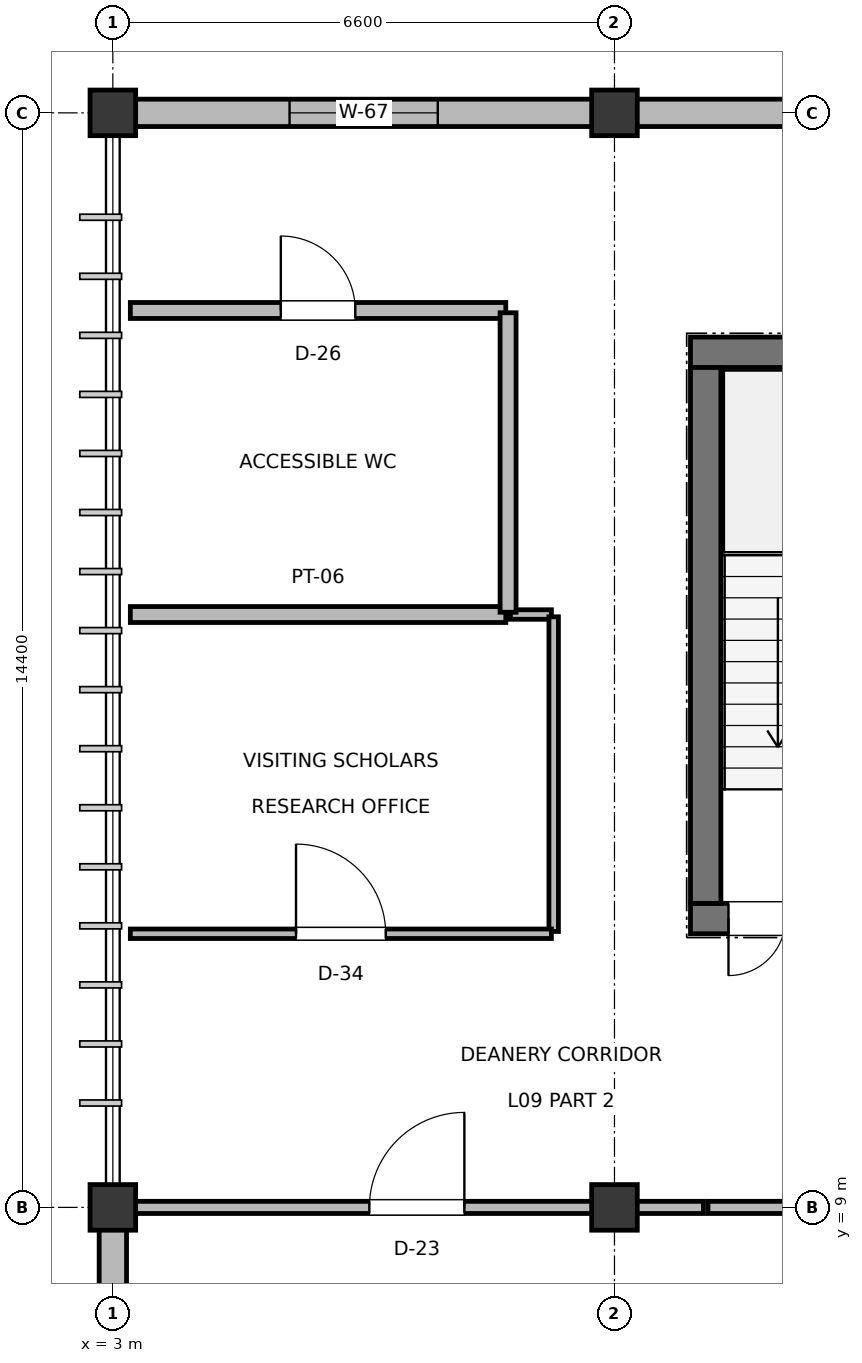
"""IFC4 building model, lengths in metres.
Left out: names, types, materials, properties, quantities, classifications, styles, units other than length and angle.
Written with IfcOpenShell. Run it as: python <this file> out.ifc"""

import sys

from ifc_helpers import new_model, si_unit, direction, frame, frame_2d, origin, origin_2d, place, context, subcontext, project, spatial, rectangle, extrude, element, fill, save


model = new_model("IFC4")
c1 = context("Model", 3, precision=1e-05, world=origin(), true_north=direction((0.0, 1.0)))
c2 = subcontext(c1, "Body", "Model", "MODEL_VIEW")
j1 = project(units=[si_unit("LENGTHUNIT", "METRE"), si_unit("PLANEANGLEUNIT", "RADIAN")], contexts=[c1])
p1 = place(None, origin())
s1 = spatial("IfcSite", under=j1, at=p1, CompositionType="ELEMENT")
p2 = place(p1, origin())
s2 = spatial("IfcBuilding", under=s1, at=p2, CompositionType="ELEMENT")
p3 = place(p2, frame((0.0, 0.0, 40.6)))
s3 = spatial("IfcBuildingStorey", under=s2, at=p3, CompositionType="ELEMENT", Elevation=40.6)
for number, where, z_axis, x_axis in (
    (1, (3.0, 9.0, 0.0), (0.0, 0.0, 1.0), (1.0, 0.0, 0.0)),
    (2, (3.0, 23.4, 0.0), (0.0, 0.0, 1.0), (1.0, 0.0, 0.0)),
    (3, (9.6, 9.0, 0.0), (0.0, 0.0, 1.0), (1.0, 0.0, 0.0)),
    (4, (9.6, 23.4, 0.0), (0.0, 0.0, 1.0), (1.0, 0.0, 0.0)),
):
    element("IfcColumn", number, at=place(p3, frame(where, z_axis=z_axis, x_axis=x_axis)), inside=s3, PredefinedType="COLUMN", context=c2, shape_type="SweptSolid", body=[
        extrude(rectangle(XDim=0.6, YDim=0.6, at=origin_2d()), origin(), (0.0, 0.0, 1.0), 4.0),
    ])
p4 = place(p3, frame((3.0, 3.285, 0.0), z_axis=(0.0, 0.0, 1.0), x_axis=(0.0, 1.0, 0.0)))
e5 = element("IfcWall", 5, at=p4, inside=s3, PredefinedType="SOLIDWALL", context=c2, shape_type="SweptSolid", body=[
    extrude(rectangle(XDim=5.43, YDim=0.36, at=frame_2d((2.715, 0.0))), origin(), (0.0, 0.0, 1.0), 3.045),
])
p5 = place(p4, frame((1.84, 0.0, 0.9)))
e6 = element("IfcOpeningElement", 6, at=p5, cuts=e5, PredefinedType="OPENING", context=c2, shape_type="SweptSolid", body=[
    extrude(rectangle(XDim=1.75, YDim=1.75, at=frame_2d((0.875, 0.875))), frame((0.0, 0.19, 0.0), z_axis=(0.0, -1.0, 0.0), x_axis=(1.0, 0.0, 0.0)), (0.0, 0.0, 1.0), 0.38),
])
p6 = place(p3, frame((3.285, 23.4, 0.0), z_axis=(0.0, 0.0, 1.0), x_axis=(1.0, 0.0, 0.0)))
e7 = element("IfcWall", 7, at=p6, inside=s3, PredefinedType="SOLIDWALL", context=c2, shape_type="SweptSolid", body=[
    extrude(rectangle(XDim=6.03, YDim=0.36, at=frame_2d((3.015, 0.0))), origin(), (0.0, 0.0, 1.0), 2.865),
])
p7 = place(p6, frame((2.04, 0.0, 0.9)))
e8 = element("IfcOpeningElement", 8, at=p7, cuts=e7, PredefinedType="OPENING", context=c2, shape_type="SweptSolid", body=[
    extrude(rectangle(XDim=1.95, YDim=1.55, at=frame_2d((0.975, 0.775))), frame((0.0, 0.19, 0.0), z_axis=(0.0, -1.0, 0.0), x_axis=(1.0, 0.0, 0.0)), (0.0, 0.0, 1.0), 0.38),
])
p8 = place(p3, frame((9.885, 23.4, 0.0), z_axis=(0.0, 0.0, 1.0), x_axis=(1.0, 0.0, 0.0)))
e9 = element("IfcWall", 9, at=p8, inside=s3, PredefinedType="SOLIDWALL", context=c2, shape_type="SweptSolid", body=[
    extrude(rectangle(XDim=6.03, YDim=0.36, at=frame_2d((3.015, 0.0))), origin(), (0.0, 0.0, 1.0), 2.995),
])
p9 = place(p8, frame((2.04, 0.0, 0.9)))
e10 = element("IfcOpeningElement", 10, at=p9, cuts=e9, PredefinedType="OPENING", context=c2, shape_type="SweptSolid", body=[
    extrude(rectangle(XDim=1.95, YDim=1.75, at=frame_2d((0.975, 0.875))), frame((0.0, 0.19, 0.0), z_axis=(0.0, -1.0, 0.0), x_axis=(1.0, 0.0, 0.0)), (0.0, 0.0, 1.0), 0.38),
])
p10 = place(p3, frame((10.6, 12.8, 0.0), z_axis=(0.0, 0.0, 1.0), x_axis=(1.0, 0.0, 0.0)))
e11 = element("IfcWall", 11, at=p10, inside=s3, PredefinedType="SHEAR", context=c2, shape_type="SweptSolid", body=[
    extrude(rectangle(XDim=3.95, YDim=0.4, at=frame_2d((1.975, 0.0))), origin(), (0.0, 0.0, 1.0), 3.78),
])
p11 = place(p10, frame((0.5, 0.0, 0.0)))
e12 = element("IfcOpeningElement", 12, at=p11, cuts=e11, PredefinedType="OPENING", context=c2, shape_type="SweptSolid", body=[
    extrude(rectangle(XDim=1.5, YDim=2.2, at=frame_2d((0.75, 1.1))), frame((0.0, 0.21, 0.0), z_axis=(0.0, -1.0, 0.0), x_axis=(1.0, 0.0, 0.0)), (0.0, 0.0, 1.0), 0.42),
])
p12 = place(p3, frame((10.6, 20.25, 0.0), z_axis=(0.0, 0.0, 1.0), x_axis=(1.0, 0.0, 0.0)))
e13 = element("IfcWall", 13, at=p12, inside=s3, PredefinedType="SHEAR", context=c2, shape_type="SweptSolid", body=[
    extrude(rectangle(XDim=3.95, YDim=0.4, at=frame_2d((1.975, 0.0))), origin(), (0.0, 0.0, 1.0), 3.78),
])
p13 = place(p3, frame((10.8, 13.0, 0.0), z_axis=(0.0, 0.0, 1.0), x_axis=(0.0, 1.0, 0.0)))
e14 = element("IfcWall", 14, at=p13, inside=s3, PredefinedType="SHEAR", context=c2, shape_type="SweptSolid", body=[
    extrude(rectangle(XDim=7.05, YDim=0.4, at=frame_2d((3.525, 0.0))), origin(), (0.0, 0.0, 1.0), 3.78),
])
p14 = place(p3, frame((3.23, 9.0, 0.0), z_axis=(0.0, 0.0, 1.0), x_axis=(1.0, 0.0, 0.0)))
e15 = element("IfcWall", 15, at=p14, inside=s3, PredefinedType="PARTITIONING", context=c2, shape_type="SweptSolid", body=[
    extrude(rectangle(XDim=7.54, YDim=0.16, at=frame_2d((3.77, 0.0))), origin(), (0.0, 0.0, 1.0), 2.925),
])
p15 = place(p14, frame((3.145, 0.0, 0.0)))
e16 = element("IfcOpeningElement", 16, at=p15, cuts=e15, PredefinedType="OPENING", context=c2, shape_type="SweptSolid", body=[
    extrude(rectangle(XDim=1.25, YDim=2.2, at=frame_2d((0.625, 1.1))), frame((0.0, 0.09, 0.0), z_axis=(0.0, -1.0, 0.0), x_axis=(1.0, 0.0, 0.0)), (0.0, 0.0, 1.0), 0.18),
])
p16 = place(p3, frame((10.83, 9.0, 0.0), z_axis=(0.0, 0.0, 1.0), x_axis=(1.0, 0.0, 0.0)))
e17 = element("IfcWall", 17, at=p16, inside=s3, PredefinedType="PARTITIONING", context=c2, shape_type="SweptSolid", body=[
    extrude(rectangle(XDim=4.14, YDim=0.16, at=frame_2d((2.07, 0.0))), origin(), (0.0, 0.0, 1.0), 2.995),
])
p17 = place(p3, frame((3.23, 16.8, 0.0), z_axis=(0.0, 0.0, 1.0), x_axis=(1.0, 0.0, 0.0)))
e18 = element("IfcWall", 18, at=p17, inside=s3, PredefinedType="PLUMBINGWALL", context=c2, shape_type="SweptSolid", body=[
    extrude(rectangle(XDim=4.94, YDim=0.21, at=frame_2d((2.47, 0.0))), origin(), (0.0, 0.0, 1.0), 3.045),
])
p18 = place(p3, frame((8.23, 16.8, 0.0), z_axis=(0.0, 0.0, 1.0), x_axis=(1.0, 0.0, 0.0)))
e19 = element("IfcWall", 19, at=p18, inside=s3, PredefinedType="PARTITIONING", context=c2, shape_type="SweptSolid", body=[
    extrude(rectangle(XDim=0.54, YDim=0.125, at=frame_2d((0.27, 0.0))), origin(), (0.0, 0.0, 1.0), 3.68),
])
p19 = place(p3, frame((8.8, 12.63, 0.0), z_axis=(0.0, 0.0, 1.0), x_axis=(0.0, 1.0, 0.0)))
e20 = element("IfcWall", 20, at=p19, inside=s3, PredefinedType="PARTITIONING", context=c2, shape_type="SweptSolid", body=[
    extrude(rectangle(XDim=4.14, YDim=0.125, at=frame_2d((2.07, 0.0))), origin(), (0.0, 0.0, 1.0), 3.68),
])
p20 = place(p3, frame((3.23, 12.6, 0.0), z_axis=(0.0, 0.0, 1.0), x_axis=(1.0, 0.0, 0.0)))
e21 = element("IfcWall", 21, at=p20, inside=s3, PredefinedType="PARTITIONING", context=c2, shape_type="SweptSolid", body=[
    extrude(rectangle(XDim=5.54, YDim=0.125, at=frame_2d((2.77, 0.0))), origin(), (0.0, 0.0, 1.0), 3.045),
])
p21 = place(p20, frame((2.18, 0.0, 0.0)))
e22 = element("IfcOpeningElement", 22, at=p21, cuts=e21, PredefinedType="OPENING", context=c2, shape_type="SweptSolid", body=[
    extrude(rectangle(XDim=1.18, YDim=2.2, at=frame_2d((0.59, 1.1))), frame((0.0, 0.073, 0.0), z_axis=(0.0, -1.0, 0.0), x_axis=(1.0, 0.0, 0.0)), (0.0, 0.0, 1.0), 0.145),
])
p22 = place(p3, frame((3.23, 20.8, 0.0), z_axis=(0.0, 0.0, 1.0), x_axis=(1.0, 0.0, 0.0)))
e23 = element("IfcWall", 23, at=p22, inside=s3, PredefinedType="PLUMBINGWALL", context=c2, shape_type="SweptSolid", body=[
    extrude(rectangle(XDim=4.94, YDim=0.21, at=frame_2d((2.47, 0.0))), origin(), (0.0, 0.0, 1.0), 3.045),
])
p23 = place(p22, frame((1.98, 0.0, 0.0)))
e24 = element("IfcOpeningElement", 24, at=p23, cuts=e23, PredefinedType="OPENING", context=c2, shape_type="SweptSolid", body=[
    extrude(rectangle(XDim=0.98, YDim=2.1, at=frame_2d((0.49, 1.05))), frame((0.0, 0.115, 0.0), z_axis=(0.0, -1.0, 0.0), x_axis=(1.0, 0.0, 0.0)), (0.0, 0.0, 1.0), 0.23),
])
p24 = place(p3, frame((8.2, 16.83, 0.0), z_axis=(0.0, 0.0, 1.0), x_axis=(0.0, 1.0, 0.0)))
e25 = element("IfcWall", 25, at=p24, inside=s3, PredefinedType="PLUMBINGWALL", context=c2, shape_type="SweptSolid", body=[
    extrude(rectangle(XDim=3.94, YDim=0.21, at=frame_2d((1.97, 0.0))), origin(), (0.0, 0.0, 1.0), 3.68),
])
p25 = place(p7, origin())
e26 = element("IfcWindow", 26, at=p25, inside=s3, PartitioningType="DOUBLE_PANEL_VERTICAL", PredefinedType="WINDOW", context=c2, shape_type="SweptSolid", body=[
    extrude(rectangle(XDim=1.95, YDim=1.55, at=frame_2d((0.975, 0.775))), frame((0.0, 0.03, 0.0), z_axis=(0.0, -1.0, 0.0), x_axis=(1.0, 0.0, 0.0)), (0.0, 0.0, 1.0), 0.06),
])
fill(e8, e26)
p26 = place(p11, frame((1.5, 0.0, 0.0), z_axis=(0.0, 0.0, 1.0), x_axis=(-1.0, 0.0, 0.0)))
e27 = element("IfcDoor", 27, at=p26, inside=s3, OperationType="DOUBLE_DOOR_SINGLE_SWING", PredefinedType="DOOR", context=c2, shape_type="SweptSolid", body=[
    extrude(rectangle(XDim=1.5, YDim=2.2, at=frame_2d((0.75, 1.1))), frame((0.0, 0.025, 0.0), z_axis=(0.0, -1.0, 0.0), x_axis=(1.0, 0.0, 0.0)), (0.0, 0.0, 1.0), 0.05),
])
fill(e12, e27)
p27 = place(p15, origin())
e28 = element("IfcDoor", 28, at=p27, inside=s3, OperationType="SINGLE_SWING_RIGHT", PredefinedType="DOOR", context=c2, shape_type="SweptSolid", body=[
    extrude(rectangle(XDim=1.25, YDim=2.2, at=frame_2d((0.625, 1.1))), frame((0.0, 0.025, 0.0), z_axis=(0.0, -1.0, 0.0), x_axis=(1.0, 0.0, 0.0)), (0.0, 0.0, 1.0), 0.05),
])
fill(e16, e28)
p28 = place(p21, origin())
e29 = element("IfcDoor", 29, at=p28, inside=s3, OperationType="SINGLE_SWING_LEFT", PredefinedType="DOOR", context=c2, shape_type="SweptSolid", body=[
    extrude(rectangle(XDim=1.18, YDim=2.2, at=frame_2d((0.59, 1.1))), frame((0.0, 0.025, 0.0), z_axis=(0.0, -1.0, 0.0), x_axis=(1.0, 0.0, 0.0)), (0.0, 0.0, 1.0), 0.05),
])
fill(e22, e29)
p29 = place(p23, origin())
e30 = element("IfcDoor", 30, at=p29, inside=s3, OperationType="SINGLE_SWING_LEFT", PredefinedType="DOOR", context=c2, shape_type="SweptSolid", body=[
    extrude(rectangle(XDim=0.98, YDim=2.1, at=frame_2d((0.49, 1.05))), frame((0.0, 0.025, 0.0), z_axis=(0.0, -1.0, 0.0), x_axis=(1.0, 0.0, 0.0)), (0.0, 0.0, 1.0), 0.05),
])
fill(e24, e30)
save(model, sys.argv[1])
